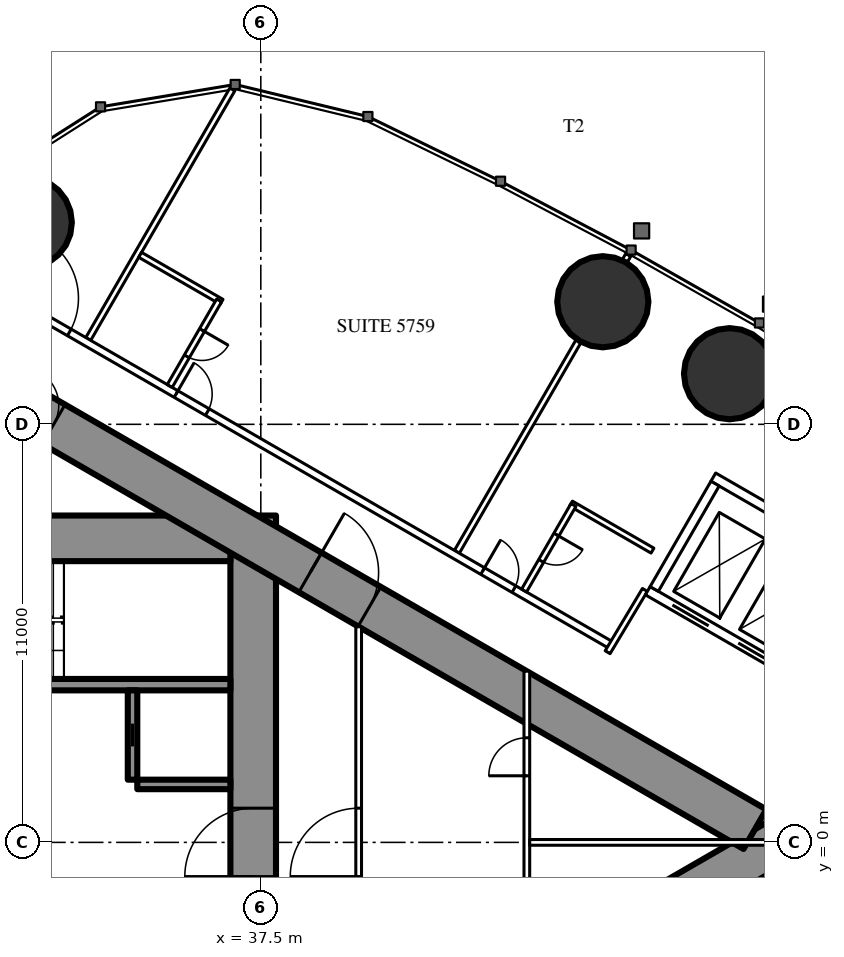
"""IFC4 building model, lengths in metres.
Left out: names, types, materials, properties, quantities, classifications, styles, units other than length and angle.
Written with IfcOpenShell. Run it as: python <this file> out.ifc"""

import sys

from ifc_helpers import new_model, si_unit, direction, frame, frame_2d, origin, origin_2d, place, context, subcontext, project, spatial, rectangle, circle, extrude, element, fill, save


model = new_model("IFC4")
c1 = context("Model", 3, precision=1e-05, world=origin(), true_north=direction((0.0, 1.0)))
c2 = subcontext(c1, "Body", "Model", "MODEL_VIEW")
j1 = project(units=[si_unit("LENGTHUNIT", "METRE"), si_unit("PLANEANGLEUNIT", "RADIAN")], contexts=[c1])
p1 = place(None, origin())
s1 = spatial("IfcSite", under=j1, at=p1, CompositionType="ELEMENT")
p2 = place(p1, origin())
s2 = spatial("IfcBuilding", under=s1, at=p2, CompositionType="ELEMENT")
p3 = place(p2, frame((0.0, 0.0, 215.3)))
s3 = spatial("IfcBuildingStorey", under=s2, at=p3, CompositionType="ELEMENT", Elevation=215.3)
for number, where, z_axis, x_axis in (
    (1, (31.328, 16.311, 0.0), (0.0, 0.0, 1.0), (1.0, 0.0, 0.0)),
    (2, (49.834, 12.332, 0.0), (0.0, 0.0, 1.0), (1.0, 0.0, 0.0)),
    (3, (46.499, 14.226, 0.0), (0.0, 0.0, 1.0), (1.0, 0.0, 0.0)),
):
    element("IfcColumn", number, at=place(p3, frame(where, z_axis=z_axis, x_axis=x_axis)), inside=s3, PredefinedType="COLUMN", context=c2, shape_type="SweptSolid", body=[
        extrude(circle(Radius=1.2, at=origin_2d()), origin(), (0.0, 0.0, 1.0), 3.6),
    ])
p4 = place(p3, frame((37.3, -8.6, 0.0), z_axis=(0.0, 0.0, 1.0), x_axis=(0.0, 1.0, 0.0)))
e4 = element("IfcWall", 4, at=p4, inside=s3, PredefinedType="SHEAR", context=c2, shape_type="SweptSolid", body=[
    extrude(rectangle(XDim=17.2, YDim=1.2, at=frame_2d((8.6, 0.0))), origin(), (0.0, 0.0, 1.0), 3.6),
])
p5 = place(p4, frame((7.7, 0.0, 0.0)))
e5 = element("IfcOpeningElement", 5, at=p5, cuts=e4, PredefinedType="OPENING", context=c2, shape_type="SweptSolid", body=[
    extrude(rectangle(XDim=1.8, YDim=2.2, at=frame_2d((0.9, 1.1))), frame((0.0, 0.61, 0.0), z_axis=(0.0, -1.0, 0.0), x_axis=(1.0, 0.0, 0.0)), (0.0, 0.0, 1.0), 1.22),
])
p6 = place(p3, frame((28.3, 8.0, 0.0), z_axis=(0.0, 0.0, 1.0), x_axis=(1.0, 0.0, 0.0)))
e6 = element("IfcWall", 6, at=p6, inside=s3, PredefinedType="SHEAR", context=c2, shape_type="SweptSolid", body=[
    extrude(rectangle(XDim=8.4, YDim=1.2, at=frame_2d((4.2, 0.0))), origin(), (0.0, 0.0, 1.0), 3.6),
])
p7 = place(p6, frame((0.25, 0.0, 0.0)))
e7 = element("IfcOpeningElement", 7, at=p7, cuts=e6, PredefinedType="OPENING", context=c2, shape_type="SweptSolid", body=[
    extrude(rectangle(XDim=1.0, YDim=2.2, at=frame_2d((0.5, 1.1))), frame((0.0, 0.61, 0.0), z_axis=(0.0, -1.0, 0.0), x_axis=(1.0, 0.0, 0.0)), (0.0, 0.0, 1.0), 1.22),
])
p8 = place(p3, frame((28.3, 4.15, 0.0), z_axis=(0.0, 0.0, 1.0), x_axis=(1.0, 0.0, 0.0)))
e8 = element("IfcWall", 8, at=p8, inside=s3, PredefinedType="SHEAR", context=c2, shape_type="SweptSolid", body=[
    extrude(rectangle(XDim=8.4, YDim=0.3, at=frame_2d((4.2, 0.0))), origin(), (0.0, 0.0, 1.0), 3.6),
])
p9 = place(p3, frame((34.125, 1.65, 0.0), z_axis=(0.0, 0.0, 1.0), x_axis=(0.0, 1.0, 0.0)))
e9 = element("IfcWall", 9, at=p9, inside=s3, PredefinedType="SHEAR", context=c2, shape_type="SweptSolid", body=[
    extrude(rectangle(XDim=2.35, YDim=0.25, at=frame_2d((1.175, 0.0))), origin(), (0.0, 0.0, 1.0), 3.6),
])
p10 = place(p9, frame((0.875, 0.0, 0.0)))
e10 = element("IfcOpeningElement", 10, at=p10, cuts=e9, PredefinedType="OPENING", context=c2, shape_type="SweptSolid", body=[
    extrude(rectangle(XDim=0.6, YDim=2.0, at=frame_2d((0.3, 1.0))), frame((0.0, 0.135, 0.0), z_axis=(0.0, -1.0, 0.0), x_axis=(1.0, 0.0, 0.0)), (0.0, 0.0, 1.0), 0.27),
])
p11 = place(p3, frame((34.25, 1.525, 0.0), z_axis=(0.0, 0.0, 1.0), x_axis=(1.0, 0.0, 0.0)))
e11 = element("IfcWall", 11, at=p11, inside=s3, PredefinedType="SHEAR", context=c2, shape_type="SweptSolid", body=[
    extrude(rectangle(XDim=2.45, YDim=0.25, at=frame_2d((1.225, 0.0))), origin(), (0.0, 0.0, 1.0), 3.6),
])
p12 = place(p3, frame((27.2, -13.8, 0.0), z_axis=(0.0, 0.0, 1.0), x_axis=(0.866027159892, 0.499996958321, 0.0)))
e12 = element("IfcWall", 12, at=p12, inside=s3, PredefinedType="SHEAR", context=c2, shape_type="SweptSolid", body=[
    extrude(rectangle(XDim=27.947, YDim=1.2, at=frame_2d((13.973, 0.0))), origin(), (0.0, 0.0, 1.0), 3.6),
])
p13 = place(p12, frame((4.6, 0.0, 0.0)))
e13 = element("IfcOpeningElement", 13, at=p13, cuts=e12, PredefinedType="OPENING", context=c2, shape_type="SweptSolid", body=[
    extrude(rectangle(XDim=1.0, YDim=2.2, at=frame_2d((0.5, 1.1))), frame((0.0, 0.61, 0.0), z_axis=(0.0, -1.0, 0.0), x_axis=(1.0, 0.0, 0.0)), (0.0, 0.0, 1.0), 1.22),
])
p14 = place(p12, frame((13.395, 0.0, 0.0)))
e14 = element("IfcOpeningElement", 14, at=p14, cuts=e12, PredefinedType="OPENING", context=c2, shape_type="SweptSolid", body=[
    extrude(rectangle(XDim=1.8, YDim=2.2, at=frame_2d((0.9, 1.1))), frame((0.0, 0.61, 0.0), z_axis=(0.0, -1.0, 0.0), x_axis=(1.0, 0.0, 0.0)), (0.0, 0.0, 1.0), 1.22),
])
p15 = place(p3, frame((27.2, 13.8, 0.0), z_axis=(0.0, 0.0, 1.0), x_axis=(0.866024515034, -0.500001539357, 0.0)))
e15 = element("IfcWall", 15, at=p15, inside=s3, PredefinedType="SHEAR", context=c2, shape_type="SweptSolid", body=[
    extrude(rectangle(XDim=26.907, YDim=1.2, at=frame_2d((13.454, 0.0))), origin(), (0.0, 0.0, 1.0), 3.6),
])
p16 = place(p15, frame((4.6, 0.0, 0.0)))
e16 = element("IfcOpeningElement", 16, at=p16, cuts=e15, PredefinedType="OPENING", context=c2, shape_type="SweptSolid", body=[
    extrude(rectangle(XDim=1.0, YDim=2.2, at=frame_2d((0.5, 1.1))), frame((0.0, 0.61, 0.0), z_axis=(0.0, -1.0, 0.0), x_axis=(1.0, 0.0, 0.0)), (0.0, 0.0, 1.0), 1.22),
])
p17 = place(p15, frame((13.395, 0.0, 0.0)))
e17 = element("IfcOpeningElement", 17, at=p17, cuts=e15, PredefinedType="OPENING", context=c2, shape_type="SweptSolid", body=[
    extrude(rectangle(XDim=1.8, YDim=2.2, at=frame_2d((0.9, 1.1))), frame((0.0, 0.61, 0.0), z_axis=(0.0, -1.0, 0.0), x_axis=(1.0, 0.0, 0.0)), (0.0, 0.0, 1.0), 1.22),
])
p18 = place(p3, frame((28.959, -15.44, 0.0), z_axis=(0.0, 0.0, 1.0), x_axis=(0.866025227435, 0.500000305447, 0.0)))
e18 = element("IfcWall", 18, at=p18, inside=s3, PredefinedType="PARTITIONING", context=c2, shape_type="SweptSolid", body=[
    extrude(rectangle(XDim=30.88, YDim=0.2, at=frame_2d((15.44, 0.0))), origin(), (0.0, 0.0, 1.0), 3.35),
])
p19 = place(p18, frame((0.494, 0.0, 0.0)))
e19 = element("IfcOpeningElement", 19, at=p19, cuts=e18, PredefinedType="OPENING", context=c2, shape_type="SweptSolid", body=[
    extrude(rectangle(XDim=1.8, YDim=2.2, at=frame_2d((0.9, 1.1))), frame((0.0, 0.11, 0.0), z_axis=(0.0, -1.0, 0.0), x_axis=(1.0, 0.0, 0.0)), (0.0, 0.0, 1.0), 0.22),
])
p20 = place(p18, frame((7.687, 0.0, 0.0)))
e20 = element("IfcOpeningElement", 20, at=p20, cuts=e18, PredefinedType="OPENING", context=c2, shape_type="SweptSolid", body=[
    extrude(rectangle(XDim=1.0, YDim=2.2, at=frame_2d((0.5, 1.1))), frame((0.0, 0.11, 0.0), z_axis=(0.0, -1.0, 0.0), x_axis=(1.0, 0.0, 0.0)), (0.0, 0.0, 1.0), 0.22),
])
p21 = place(p18, frame((16.137, 0.0, 0.0)))
e21 = element("IfcOpeningElement", 21, at=p21, cuts=e18, PredefinedType="OPENING", context=c2, shape_type="SweptSolid", body=[
    extrude(rectangle(XDim=0.95, YDim=2.2, at=frame_2d((0.475, 1.1))), frame((0.0, 0.11, 0.0), z_axis=(0.0, -1.0, 0.0), x_axis=(1.0, 0.0, 0.0)), (0.0, 0.0, 1.0), 0.22),
])
p22 = place(p18, frame((20.021, 0.0, 0.0)))
e22 = element("IfcOpeningElement", 22, at=p22, cuts=e18, PredefinedType="OPENING", context=c2, shape_type="SweptSolid", body=[
    extrude(rectangle(XDim=0.95, YDim=2.2, at=frame_2d((0.475, 1.1))), frame((0.0, 0.11, 0.0), z_axis=(0.0, -1.0, 0.0), x_axis=(1.0, 0.0, 0.0)), (0.0, 0.0, 1.0), 0.22),
])
p23 = place(p18, frame((26.253, 0.0, 0.0)))
e23 = element("IfcOpeningElement", 23, at=p23, cuts=e18, PredefinedType="OPENING", context=c2, shape_type="SweptSolid", body=[
    extrude(rectangle(XDim=0.95, YDim=2.2, at=frame_2d((0.475, 1.1))), frame((0.0, 0.11, 0.0), z_axis=(0.0, -1.0, 0.0), x_axis=(1.0, 0.0, 0.0)), (0.0, 0.0, 1.0), 0.22),
])
p24 = place(p3, frame((32.96, 13.246, 0.0), z_axis=(0.0, 0.0, 1.0), x_axis=(0.500000236886, 0.866025267018, 0.0)))
e24 = element("IfcWall", 24, at=p24, inside=s3, PredefinedType="PARTITIONING", context=c2, shape_type="SweptSolid", body=[
    extrude(rectangle(XDim=7.583, YDim=0.15, at=frame_2d((3.791, 0.0))), origin(), (0.0, 0.0, 1.0), 3.35),
])
p25 = place(p3, frame((42.66, 7.646, 0.0), z_axis=(0.0, 0.0, 1.0), x_axis=(0.499996592859, 0.866027370889, 0.0)))
e25 = element("IfcWall", 25, at=p25, inside=s3, PredefinedType="PARTITIONING", context=c2, shape_type="SweptSolid", body=[
    extrude(rectangle(XDim=6.398, YDim=0.15, at=frame_2d((3.199, 0.0))), origin(), (0.0, 0.0, 1.0), 2.45),
])
p26 = place(p3, frame((47.079, 15.3, 0.0), z_axis=(0.0, 0.0, 1.0), x_axis=(0.499212083968, 0.866479829667, 0.0)))
e26 = element("IfcWall", 26, at=p26, inside=s3, PredefinedType="PARTITIONING", context=c2, shape_type="SweptSolid", body=[
    extrude(rectangle(XDim=0.179, YDim=0.15, at=frame_2d((0.09, 0.0))), origin(), (0.0, 0.0, 1.0), 2.45),
])
p27 = place(p3, frame((28.959, 15.44, 0.0), z_axis=(0.0, 0.0, 1.0), x_axis=(0.866028936079, -0.499993881836, 0.0)))
e27 = element("IfcWall", 27, at=p27, inside=s3, PredefinedType="PARTITIONING", context=c2, shape_type="SweptSolid", body=[
    extrude(rectangle(XDim=20.503, YDim=0.2, at=frame_2d((10.251, 0.0))), origin(), (0.0, 0.0, 1.0), 3.35),
])
p28 = place(p27, frame((16.603, 0.0, 0.0)))
e28 = element("IfcOpeningElement", 28, at=p28, cuts=e27, PredefinedType="OPENING", context=c2, shape_type="SweptSolid", body=[
    extrude(rectangle(XDim=0.95, YDim=2.2, at=frame_2d((0.475, 1.1))), frame((0.0, 0.11, 0.0), z_axis=(0.0, -1.0, 0.0), x_axis=(1.0, 0.0, 0.0)), (0.0, 0.0, 1.0), 0.22),
])
p29 = place(p27, frame((7.287, 0.0, 0.0)))
e29 = element("IfcOpeningElement", 29, at=p29, cuts=e27, PredefinedType="OPENING", context=c2, shape_type="SweptSolid", body=[
    extrude(rectangle(XDim=0.95, YDim=2.2, at=frame_2d((0.475, 1.1))), frame((0.0, 0.11, 0.0), z_axis=(0.0, -1.0, 0.0), x_axis=(1.0, 0.0, 0.0)), (0.0, 0.0, 1.0), 0.22),
])
p30 = place(p27, frame((2.244, 0.0, 0.0)))
e30 = element("IfcOpeningElement", 30, at=p30, cuts=e27, PredefinedType="OPENING", context=c2, shape_type="SweptSolid", body=[
    extrude(rectangle(XDim=1.8, YDim=2.2, at=frame_2d((0.9, 1.1))), frame((0.0, 0.11, 0.0), z_axis=(0.0, -1.0, 0.0), x_axis=(1.0, 0.0, 0.0)), (0.0, 0.0, 1.0), 0.22),
])
p31 = place(p3, frame((47.606, 6.642, 0.0), z_axis=(0.0, 0.0, 1.0), x_axis=(-0.51353662755, -0.858067673418, 0.0)))
e31 = element("IfcWall", 31, at=p31, inside=s3, PredefinedType="PARTITIONING", context=c2, shape_type="SweptSolid", body=[
    extrude(rectangle(XDim=1.91, YDim=0.15, at=frame_2d((0.955, 0.0))), origin(), (0.0, 0.0, 1.0), 3.35),
])
p32 = place(p3, frame((45.662, 8.914, 0.0), z_axis=(0.0, 0.0, 1.0), x_axis=(0.86604923931, -0.499958713387, 0.0)))
e32 = element("IfcWall", 32, at=p32, inside=s3, PredefinedType="PARTITIONING", context=c2, shape_type="SweptSolid", body=[
    extrude(rectangle(XDim=2.475, YDim=0.15, at=frame_2d((1.237, 0.0))), origin(), (0.0, 0.0, 1.0), 3.35),
])
p33 = place(p3, frame((44.427, 6.625, 0.0), z_axis=(0.0, 0.0, 1.0), x_axis=(0.500006934395, 0.866021400173, 0.0)))
e33 = element("IfcWall", 33, at=p33, inside=s3, PredefinedType="PARTITIONING", context=c2, shape_type="SweptSolid", body=[
    extrude(rectangle(XDim=2.6, YDim=0.15, at=frame_2d((1.3, 0.0))), origin(), (0.0, 0.0, 1.0), 3.35),
])
p34 = place(p33, frame((0.9, 0.0, 0.0)))
e34 = element("IfcOpeningElement", 34, at=p34, cuts=e33, PredefinedType="OPENING", context=c2, shape_type="SweptSolid", body=[
    extrude(rectangle(XDim=0.8, YDim=2.2, at=frame_2d((0.4, 1.1))), frame((0.0, 0.085, 0.0), z_axis=(0.0, -1.0, 0.0), x_axis=(1.0, 0.0, 0.0)), (0.0, 0.0, 1.0), 0.17),
])
p35 = place(p3, frame((34.325, 15.46, 0.0), z_axis=(0.0, 0.0, 1.0), x_axis=(0.866031185235, -0.4999899861, 0.0)))
e35 = element("IfcWall", 35, at=p35, inside=s3, PredefinedType="PARTITIONING", context=c2, shape_type="SweptSolid", body=[
    extrude(rectangle(XDim=2.475, YDim=0.15, at=frame_2d((1.238, 0.0))), origin(), (0.0, 0.0, 1.0), 3.35),
])
p36 = place(p3, frame((35.104, 12.008, 0.0), z_axis=(0.0, 0.0, 1.0), x_axis=(0.500047596559, 0.865997922154, 0.0)))
e36 = element("IfcWall", 36, at=p36, inside=s3, PredefinedType="PARTITIONING", context=c2, shape_type="SweptSolid", body=[
    extrude(rectangle(XDim=2.6, YDim=0.15, at=frame_2d((1.3, 0.0))), origin(), (0.0, 0.0, 1.0), 3.35),
])
p37 = place(p36, frame((0.9, 0.0, 0.0)))
e37 = element("IfcOpeningElement", 37, at=p37, cuts=e36, PredefinedType="OPENING", context=c2, shape_type="SweptSolid", body=[
    extrude(rectangle(XDim=0.8, YDim=2.2, at=frame_2d((0.4, 1.1))), frame((0.0, 0.085, 0.0), z_axis=(0.0, -1.0, 0.0), x_axis=(1.0, 0.0, 0.0)), (0.0, 0.0, 1.0), 0.17),
])
p38 = place(p3, frame((40.075, -5.674, 0.0), z_axis=(0.0, 0.0, 1.0), x_axis=(0.0, 1.0, 0.0)))
e38 = element("IfcWall", 38, at=p38, inside=s3, PredefinedType="PARTITIONING", context=c2, shape_type="SweptSolid", body=[
    extrude(rectangle(XDim=11.348, YDim=0.15, at=frame_2d((5.674, 0.0))), origin(), (0.0, 0.0, 1.0), 3.35),
])
p39 = place(p38, frame((4.774, 0.0, 0.0)))
e39 = element("IfcOpeningElement", 39, at=p39, cuts=e38, PredefinedType="OPENING", context=c2, shape_type="SweptSolid", body=[
    extrude(rectangle(XDim=1.8, YDim=2.2, at=frame_2d((0.9, 1.1))), frame((0.0, 0.085, 0.0), z_axis=(0.0, -1.0, 0.0), x_axis=(1.0, 0.0, 0.0)), (0.0, 0.0, 1.0), 0.17),
])
p40 = place(p3, frame((44.5, -4.505, 0.0), z_axis=(0.0, 0.0, 1.0), x_axis=(0.0, 1.0, 0.0)))
e40 = element("IfcWall", 40, at=p40, inside=s3, PredefinedType="PARTITIONING", context=c2, shape_type="SweptSolid", body=[
    extrude(rectangle(XDim=9.009, YDim=0.15, at=frame_2d((4.505, 0.0))), origin(), (0.0, 0.0, 1.0), 3.35),
])
p41 = place(p40, frame((1.752, 0.0, 0.0)))
e41 = element("IfcOpeningElement", 41, at=p41, cuts=e40, PredefinedType="OPENING", context=c2, shape_type="SweptSolid", body=[
    extrude(rectangle(XDim=1.0, YDim=2.2, at=frame_2d((0.5, 1.1))), frame((0.0, 0.085, 0.0), z_axis=(0.0, -1.0, 0.0), x_axis=(1.0, 0.0, 0.0)), (0.0, 0.0, 1.0), 0.17),
])
p42 = place(p40, frame((6.257, 0.0, 0.0)))
e42 = element("IfcOpeningElement", 42, at=p42, cuts=e40, PredefinedType="OPENING", context=c2, shape_type="SweptSolid", body=[
    extrude(rectangle(XDim=1.0, YDim=2.2, at=frame_2d((0.5, 1.1))), frame((0.0, 0.085, 0.0), z_axis=(0.0, -1.0, 0.0), x_axis=(1.0, 0.0, 0.0)), (0.0, 0.0, 1.0), 0.17),
])
p43 = place(p3, frame((44.575, 0.0, 0.0), z_axis=(0.0, 0.0, 1.0), x_axis=(1.0, 0.0, 0.0)))
e43 = element("IfcWall", 43, at=p43, inside=s3, PredefinedType="PARTITIONING", context=c2, shape_type="SweptSolid", body=[
    extrude(rectangle(XDim=7.727, YDim=0.15, at=frame_2d((3.864, 0.0))), origin(), (0.0, 0.0, 1.0), 2.45),
])
p44 = place(p3, frame((47.681, 6.622, 0.0), z_axis=(0.0, 0.0, 1.0), x_axis=(0.86603344179, -0.499986077507, 0.0)))
e44 = element("IfcWall", 44, at=p44, inside=s3, PredefinedType="PARTITIONING", context=c2, shape_type="SweptSolid", body=[
    extrude(rectangle(XDim=6.6, YDim=0.25, at=frame_2d((3.3, 0.0))), origin(), (0.0, 0.0, 1.0), 3.35),
])
p45 = place(p44, frame((0.75, 0.0, 0.0)))
e45 = element("IfcOpeningElement", 45, at=p45, cuts=e44, PredefinedType="OPENING", context=c2, shape_type="SweptSolid", body=[
    extrude(rectangle(XDim=1.1, YDim=2.2, at=frame_2d((0.55, 1.1))), frame((0.0, 0.135, 0.0), z_axis=(0.0, -1.0, 0.0), x_axis=(1.0, 0.0, 0.0)), (0.0, 0.0, 1.0), 0.27),
])
p46 = place(p44, frame((2.75, 0.0, 0.0)))
e46 = element("IfcOpeningElement", 46, at=p46, cuts=e44, PredefinedType="OPENING", context=c2, shape_type="SweptSolid", body=[
    extrude(rectangle(XDim=1.1, YDim=2.2, at=frame_2d((0.55, 1.1))), frame((0.0, 0.135, 0.0), z_axis=(0.0, -1.0, 0.0), x_axis=(1.0, 0.0, 0.0)), (0.0, 0.0, 1.0), 0.27),
])
p47 = place(p44, frame((4.75, 0.0, 0.0)))
e47 = element("IfcOpeningElement", 47, at=p47, cuts=e44, PredefinedType="OPENING", context=c2, shape_type="SweptSolid", body=[
    extrude(rectangle(XDim=1.1, YDim=2.2, at=frame_2d((0.55, 1.1))), frame((0.0, 0.135, 0.0), z_axis=(0.0, -1.0, 0.0), x_axis=(1.0, 0.0, 0.0)), (0.0, 0.0, 1.0), 0.27),
])
p48 = place(p3, frame((49.406, 9.611, 0.0), z_axis=(0.0, 0.0, 1.0), x_axis=(0.86603344179, -0.499986077507, 0.0)))
e48 = element("IfcWall", 48, at=p48, inside=s3, PredefinedType="PARTITIONING", context=c2, shape_type="SweptSolid", body=[
    extrude(rectangle(XDim=6.6, YDim=0.25, at=frame_2d((3.3, 0.0))), origin(), (0.0, 0.0, 1.0), 3.35),
])
p49 = place(p3, frame((47.852, 6.668, 0.0), z_axis=(0.0, 0.0, 1.0), x_axis=(0.499929347863, 0.866066190972, 0.0)))
e49 = element("IfcWall", 49, at=p49, inside=s3, PredefinedType="PARTITIONING", context=c2, shape_type="SweptSolid", body=[
    extrude(rectangle(XDim=3.201, YDim=0.25, at=frame_2d((1.6, 0.0))), origin(), (0.0, 0.0, 1.0), 3.35),
])
p50 = place(p34, origin())
e50 = element("IfcDoor", 50, at=p50, inside=s3, OperationType="SINGLE_SWING_RIGHT", PredefinedType="DOOR", context=c2, shape_type="SweptSolid", body=[
    extrude(rectangle(XDim=0.8, YDim=2.2, at=frame_2d((0.4, 1.1))), frame((0.0, 0.025, 0.0), z_axis=(0.0, -1.0, 0.0), x_axis=(1.0, 0.0, 0.0)), (0.0, 0.0, 1.0), 0.05),
])
fill(e34, e50)
p51 = place(p28, origin())
e51 = element("IfcDoor", 51, at=p51, inside=s3, OperationType="SINGLE_SWING_LEFT", PredefinedType="DOOR", context=c2, shape_type="SweptSolid", body=[
    extrude(rectangle(XDim=0.95, YDim=2.2, at=frame_2d((0.475, 1.1))), frame((0.0, 0.025, 0.0), z_axis=(0.0, -1.0, 0.0), x_axis=(1.0, 0.0, 0.0)), (0.0, 0.0, 1.0), 0.05),
])
fill(e28, e51)
p52 = place(p37, origin())
e52 = element("IfcDoor", 52, at=p52, inside=s3, OperationType="SINGLE_SWING_RIGHT", PredefinedType="DOOR", context=c2, shape_type="SweptSolid", body=[
    extrude(rectangle(XDim=0.8, YDim=2.2, at=frame_2d((0.4, 1.1))), frame((0.0, 0.025, 0.0), z_axis=(0.0, -1.0, 0.0), x_axis=(1.0, 0.0, 0.0)), (0.0, 0.0, 1.0), 0.05),
])
fill(e37, e52)
p53 = place(p29, origin())
e53 = element("IfcDoor", 53, at=p53, inside=s3, OperationType="SINGLE_SWING_LEFT", PredefinedType="DOOR", context=c2, shape_type="SweptSolid", body=[
    extrude(rectangle(XDim=0.95, YDim=2.2, at=frame_2d((0.475, 1.1))), frame((0.0, 0.025, 0.0), z_axis=(0.0, -1.0, 0.0), x_axis=(1.0, 0.0, 0.0)), (0.0, 0.0, 1.0), 0.05),
])
fill(e29, e53)
p54 = place(p30, origin())
e54 = element("IfcDoor", 54, at=p54, inside=s3, OperationType="DOUBLE_DOOR_SINGLE_SWING", PredefinedType="DOOR", context=c2, shape_type="SweptSolid", body=[
    extrude(rectangle(XDim=1.8, YDim=2.2, at=frame_2d((0.9, 1.1))), frame((0.0, 0.025, 0.0), z_axis=(0.0, -1.0, 0.0), x_axis=(1.0, 0.0, 0.0)), (0.0, 0.0, 1.0), 0.05),
])
fill(e30, e54)
p55 = place(p39, origin())
e55 = element("IfcDoor", 55, at=p55, inside=s3, OperationType="DOUBLE_DOOR_SINGLE_SWING", PredefinedType="DOOR", context=c2, shape_type="SweptSolid", body=[
    extrude(rectangle(XDim=1.8, YDim=2.2, at=frame_2d((0.9, 1.1))), frame((0.0, 0.025, 0.0), z_axis=(0.0, -1.0, 0.0), x_axis=(1.0, 0.0, 0.0)), (0.0, 0.0, 1.0), 0.05),
])
fill(e39, e55)
p56 = place(p42, origin())
e56 = element("IfcDoor", 56, at=p56, inside=s3, OperationType="SINGLE_SWING_LEFT", PredefinedType="DOOR", context=c2, shape_type="SweptSolid", body=[
    extrude(rectangle(XDim=1.0, YDim=2.2, at=frame_2d((0.5, 1.1))), frame((0.0, 0.025, 0.0), z_axis=(0.0, -1.0, 0.0), x_axis=(1.0, 0.0, 0.0)), (0.0, 0.0, 1.0), 0.05),
])
fill(e42, e56)
p57 = place(p16, origin())
e57 = element("IfcDoor", 57, at=p57, inside=s3, OperationType="SINGLE_SWING_LEFT", PredefinedType="DOOR", context=c2, shape_type="SweptSolid", body=[
    extrude(rectangle(XDim=1.0, YDim=2.2, at=frame_2d((0.5, 1.1))), frame((0.0, 0.025, 0.0), z_axis=(0.0, -1.0, 0.0), x_axis=(1.0, 0.0, 0.0)), (0.0, 0.0, 1.0), 0.05),
])
fill(e16, e57)
p58 = place(p17, origin())
e58 = element("IfcDoor", 58, at=p58, inside=s3, OperationType="DOUBLE_DOOR_SINGLE_SWING", PredefinedType="DOOR", context=c2, shape_type="SweptSolid", body=[
    extrude(rectangle(XDim=1.8, YDim=2.2, at=frame_2d((0.9, 1.1))), frame((0.0, 0.025, 0.0), z_axis=(0.0, -1.0, 0.0), x_axis=(1.0, 0.0, 0.0)), (0.0, 0.0, 1.0), 0.05),
])
fill(e17, e58)
p59 = place(p5, origin())
e59 = element("IfcDoor", 59, at=p59, inside=s3, OperationType="DOUBLE_DOOR_SINGLE_SWING", PredefinedType="DOOR", context=c2, shape_type="SweptSolid", body=[
    extrude(rectangle(XDim=1.8, YDim=2.2, at=frame_2d((0.9, 1.1))), frame((0.0, 0.025, 0.0), z_axis=(0.0, -1.0, 0.0), x_axis=(1.0, 0.0, 0.0)), (0.0, 0.0, 1.0), 0.05),
])
fill(e5, e59)
p60 = place(p10, origin())
e60 = element("IfcDoor", 60, at=p60, inside=s3, OperationType="SLIDING_TO_LEFT", PredefinedType="DOOR", context=c2, shape_type="SweptSolid", body=[
    extrude(rectangle(XDim=0.6, YDim=2.0, at=frame_2d((0.3, 1.0))), frame((0.0, 0.025, 0.0), z_axis=(0.0, -1.0, 0.0), x_axis=(1.0, 0.0, 0.0)), (0.0, 0.0, 1.0), 0.05),
])
fill(e10, e60)
p61 = place(p45, origin())
e61 = element("IfcDoor", 61, at=p61, inside=s3, OperationType="DOUBLE_DOOR_SLIDING", PredefinedType="USERDEFINED", context=c2, shape_type="SweptSolid", body=[
    extrude(rectangle(XDim=1.1, YDim=2.2, at=frame_2d((0.55, 1.1))), frame((0.0, 0.025, 0.0), z_axis=(0.0, -1.0, 0.0), x_axis=(1.0, 0.0, 0.0)), (0.0, 0.0, 1.0), 0.05),
])
fill(e45, e61)
p62 = place(p46, origin())
e62 = element("IfcDoor", 62, at=p62, inside=s3, OperationType="DOUBLE_DOOR_SLIDING", PredefinedType="USERDEFINED", context=c2, shape_type="SweptSolid", body=[
    extrude(rectangle(XDim=1.1, YDim=2.2, at=frame_2d((0.55, 1.1))), frame((0.0, 0.025, 0.0), z_axis=(0.0, -1.0, 0.0), x_axis=(1.0, 0.0, 0.0)), (0.0, 0.0, 1.0), 0.05),
])
fill(e46, e62)
save(model, sys.argv[1])
